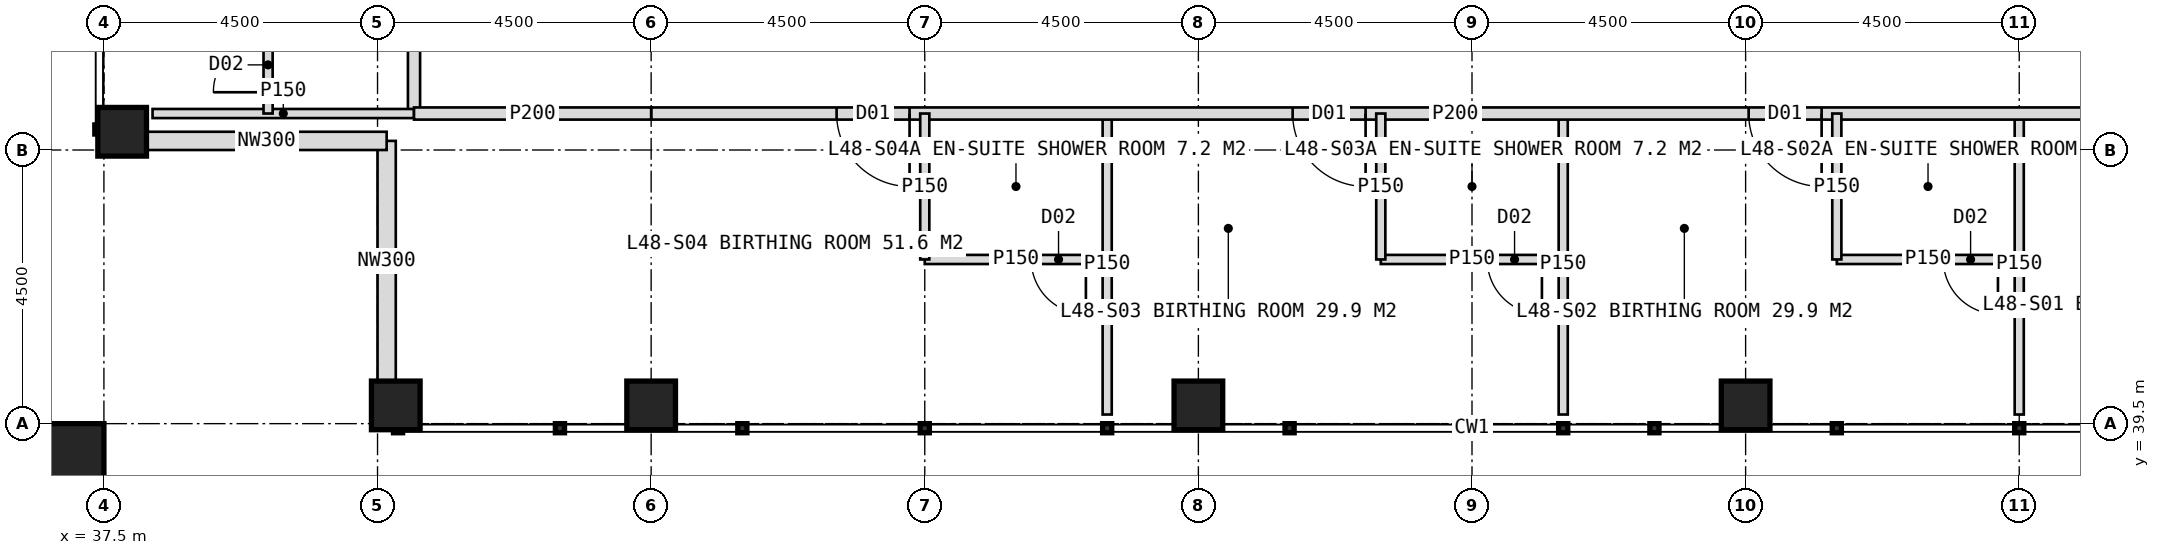
"""IFC4 building model, lengths in metres.
Left out: names, types, materials, properties, quantities, classifications, styles, units other than length and angle.
Written with IfcOpenShell. Run it as: python <this file> out.ifc"""

import sys

from ifc_helpers import new_model, si_unit, direction, frame, frame_2d, origin, origin_2d, place, context, subcontext, project, spatial, rectangle, hollow_rectangle, extrude, element, fill, save


model = new_model("IFC4")
c1 = context("Model", 3, precision=1e-05, world=origin(), true_north=direction((0.0, 1.0)))
c2 = subcontext(c1, "Body", "Model", "MODEL_VIEW")
j1 = project(units=[si_unit("LENGTHUNIT", "METRE"), si_unit("PLANEANGLEUNIT", "RADIAN")], contexts=[c1])
p1 = place(None, origin())
s1 = spatial("IfcSite", under=j1, at=p1, CompositionType="ELEMENT")
p2 = place(p1, origin())
s2 = spatial("IfcBuilding", under=s1, at=p2, CompositionType="ELEMENT")
p3 = place(p2, frame((0.0, 0.0, 201.0)))
s3 = spatial("IfcBuildingStorey", under=s2, at=p3, CompositionType="ELEMENT", Elevation=201.0)
for number, where, z_axis, x_axis in (
    (1, (42.3, 39.8, 0.0), (0.0, 0.0, 1.0), (1.0, 0.0, 0.0)),
    (2, (37.8, 44.3, 0.0), (0.0, 0.0, 1.0), (1.0, 0.0, 0.0)),
    (3, (46.5, 39.8, 0.0), (0.0, 0.0, 1.0), (1.0, 0.0, 0.0)),
    (4, (55.5, 39.8, 0.0), (0.0, 0.0, 1.0), (1.0, 0.0, 0.0)),
    (5, (64.5, 39.8, 0.0), (0.0, 0.0, 1.0), (1.0, 0.0, 0.0)),
):
    element("IfcColumn", number, at=place(p3, frame(where, z_axis=z_axis, x_axis=x_axis)), inside=s3, PredefinedType="COLUMN", context=c2, shape_type="SweptSolid", body=[
        extrude(hollow_rectangle(XDim=0.8, YDim=0.8, WallThickness=0.08, at=origin_2d()), origin(), (0.0, 0.0, 1.0), 4.0),
    ])
p4 = place(p3, frame((36.9, 38.9, 0.0), z_axis=(0.0, 0.0, 1.0), x_axis=(1.0, 0.0, 0.0)))
e6 = element("IfcColumn", 6, at=p4, inside=s3, PredefinedType="COLUMN", context=c2, shape_type="SweptSolid", body=[
    extrude(hollow_rectangle(XDim=1.2, YDim=1.2, WallThickness=0.07, at=origin_2d()), origin(), (0.0, 0.0, 1.0), 4.0),
])
for number, where, z_axis, x_axis in (
    (7, (42.15, 40.2, 0.0), (0.0, 0.0, 1.0), (0.0, 1.0, 0.0)),
    (8, (42.15, 44.15, 0.0), (0.0, 0.0, 1.0), (-1.0, 0.0, 0.0)),
):
    element("IfcWall", number, at=place(p3, frame(where, z_axis=z_axis, x_axis=x_axis)), inside=s3, PredefinedType="ELEMENTEDWALL", context=c2, shape_type="SweptSolid", body=[
        extrude(rectangle(XDim=3.95, YDim=0.3, at=frame_2d((1.975, 0.0))), origin(), (0.0, 0.0, 1.0), 2.85),
    ])
p5 = place(p3, frame((42.6, 44.6, 0.0), z_axis=(0.0, 0.0, 1.0), x_axis=(0.0, 1.0, 0.0)))
e9 = element("IfcWall", 9, at=p5, inside=s3, PredefinedType="PARTITIONING", context=c2, shape_type="SweptSolid", body=[
    extrude(rectangle(XDim=4.45, YDim=0.2, at=frame_2d((2.225, 0.0))), origin(), (0.0, 0.0, 1.0), 2.85),
])
p6 = place(p5, frame((3.25, 0.0, 0.0)))
e10 = element("IfcOpeningElement", 10, at=p6, cuts=e9, PredefinedType="OPENING", context=c2, shape_type="SweptSolid", body=[
    extrude(rectangle(XDim=1.2, YDim=2.2, at=frame_2d((0.6, 1.1))), frame((0.0, 0.11, 0.0), z_axis=(0.0, -1.0, 0.0), x_axis=(1.0, 0.0, 0.0)), (0.0, 0.0, 1.0), 0.22),
])
p7 = place(p3, frame((42.6, 44.6, 0.0), z_axis=(0.0, 0.0, 1.0), x_axis=(-1.0, 0.0, 0.0)))
e11 = element("IfcWall", 11, at=p7, inside=s3, PredefinedType="PARTITIONING", context=c2, shape_type="SweptSolid", body=[
    extrude(rectangle(XDim=4.3, YDim=0.15, at=frame_2d((2.15, 0.0))), origin(), (0.0, 0.0, 1.0), 2.85),
])
p8 = place(p3, frame((40.2, 44.6, 0.0), z_axis=(0.0, 0.0, 1.0), x_axis=(0.0, 1.0, 0.0)))
e12 = element("IfcWall", 12, at=p8, inside=s3, PredefinedType="PARTITIONING", context=c2, shape_type="SweptSolid", body=[
    extrude(rectangle(XDim=3.0, YDim=0.15, at=frame_2d((1.5, 0.0))), origin(), (0.0, 0.0, 1.0), 3.75),
])
p9 = place(p8, frame((0.35, 0.0, 0.0)))
e13 = element("IfcOpeningElement", 13, at=p9, cuts=e12, PredefinedType="OPENING", context=c2, shape_type="SweptSolid", body=[
    extrude(rectangle(XDim=0.9, YDim=2.1, at=frame_2d((0.45, 1.05))), frame((0.0, 0.085, 0.0), z_axis=(0.0, -1.0, 0.0), x_axis=(1.0, 0.0, 0.0)), (0.0, 0.0, 1.0), 0.17),
])
for number, where, z_axis, x_axis in (
    (14, (69.0, 44.6, 0.0), (0.0, 0.0, 1.0), (0.0, -1.0, 0.0)),
    (15, (61.5, 44.6, 0.0), (0.0, 0.0, 1.0), (0.0, -1.0, 0.0)),
    (16, (54.0, 44.6, 0.0), (0.0, 0.0, 1.0), (0.0, -1.0, 0.0)),
):
    element("IfcWall", number, at=place(p3, frame(where, z_axis=z_axis, x_axis=x_axis)), inside=s3, PredefinedType="PARTITIONING", context=c2, shape_type="SweptSolid", body=[
        extrude(rectangle(XDim=4.95, YDim=0.15, at=frame_2d((2.475, 0.0))), origin(), (0.0, 0.0, 1.0), 3.75),
    ])
p10 = place(p3, frame((72.95, 44.6, 0.0), z_axis=(0.0, 0.0, 1.0), x_axis=(-1.0, 0.0, 0.0)))
e17 = element("IfcWall", 17, at=p10, inside=s3, PredefinedType="PARTITIONING", context=c2, shape_type="SweptSolid", body=[
    extrude(rectangle(XDim=26.45, YDim=0.2, at=frame_2d((13.225, 0.0))), origin(), (0.0, 0.0, 1.0), 3.75),
])
p11 = place(p10, frame((7.2, 0.0, 0.0)))
e18 = element("IfcOpeningElement", 18, at=p11, cuts=e17, PredefinedType="OPENING", context=c2, shape_type="SweptSolid", body=[
    extrude(rectangle(XDim=1.2, YDim=2.2, at=frame_2d((0.6, 1.1))), frame((0.0, 0.11, 0.0), z_axis=(0.0, -1.0, 0.0), x_axis=(1.0, 0.0, 0.0)), (0.0, 0.0, 1.0), 0.22),
])
p12 = place(p10, frame((14.7, 0.0, 0.0)))
e19 = element("IfcOpeningElement", 19, at=p12, cuts=e17, PredefinedType="OPENING", context=c2, shape_type="SweptSolid", body=[
    extrude(rectangle(XDim=1.2, YDim=2.2, at=frame_2d((0.6, 1.1))), frame((0.0, 0.11, 0.0), z_axis=(0.0, -1.0, 0.0), x_axis=(1.0, 0.0, 0.0)), (0.0, 0.0, 1.0), 0.22),
])
p13 = place(p10, frame((22.2, 0.0, 0.0)))
e20 = element("IfcOpeningElement", 20, at=p13, cuts=e17, PredefinedType="OPENING", context=c2, shape_type="SweptSolid", body=[
    extrude(rectangle(XDim=1.2, YDim=2.2, at=frame_2d((0.6, 1.1))), frame((0.0, 0.11, 0.0), z_axis=(0.0, -1.0, 0.0), x_axis=(1.0, 0.0, 0.0)), (0.0, 0.0, 1.0), 0.22),
])
p14 = place(p3, frame((46.5, 44.6, 0.0), z_axis=(0.0, 0.0, 1.0), x_axis=(-1.0, 0.0, 0.0)))
e21 = element("IfcWall", 21, at=p14, inside=s3, PredefinedType="PARTITIONING", context=c2, shape_type="SweptSolid", body=[
    extrude(rectangle(XDim=3.9, YDim=0.2, at=frame_2d((1.95, 0.0))), origin(), (0.0, 0.0, 1.0), 2.85),
])
p15 = place(p3, frame((69.0, 42.2, 0.0), z_axis=(0.0, 0.0, 1.0), x_axis=(-1.0, 0.0, 0.0)))
e22 = element("IfcWall", 22, at=p15, inside=s3, PredefinedType="PARTITIONING", context=c2, shape_type="SweptSolid", body=[
    extrude(rectangle(XDim=3.0, YDim=0.15, at=frame_2d((1.5, 0.0))), origin(), (0.0, 0.0, 1.0), 3.75),
])
p16 = place(p15, frame((0.35, 0.0, 0.0)))
e23 = element("IfcOpeningElement", 23, at=p16, cuts=e22, PredefinedType="OPENING", context=c2, shape_type="SweptSolid", body=[
    extrude(rectangle(XDim=0.9, YDim=2.1, at=frame_2d((0.45, 1.05))), frame((0.0, 0.085, 0.0), z_axis=(0.0, -1.0, 0.0), x_axis=(1.0, 0.0, 0.0)), (0.0, 0.0, 1.0), 0.17),
])
p17 = place(p3, frame((66.0, 44.6, 0.0), z_axis=(0.0, 0.0, 1.0), x_axis=(0.0, -1.0, 0.0)))
e24 = element("IfcWall", 24, at=p17, inside=s3, PredefinedType="PARTITIONING", context=c2, shape_type="SweptSolid", body=[
    extrude(rectangle(XDim=2.4, YDim=0.15, at=frame_2d((1.2, 0.0))), origin(), (0.0, 0.0, 1.0), 3.75),
])
p18 = place(p3, frame((61.5, 42.2, 0.0), z_axis=(0.0, 0.0, 1.0), x_axis=(-1.0, 0.0, 0.0)))
e25 = element("IfcWall", 25, at=p18, inside=s3, PredefinedType="PARTITIONING", context=c2, shape_type="SweptSolid", body=[
    extrude(rectangle(XDim=3.0, YDim=0.15, at=frame_2d((1.5, 0.0))), origin(), (0.0, 0.0, 1.0), 3.75),
])
p19 = place(p18, frame((0.35, 0.0, 0.0)))
e26 = element("IfcOpeningElement", 26, at=p19, cuts=e25, PredefinedType="OPENING", context=c2, shape_type="SweptSolid", body=[
    extrude(rectangle(XDim=0.9, YDim=2.1, at=frame_2d((0.45, 1.05))), frame((0.0, 0.085, 0.0), z_axis=(0.0, -1.0, 0.0), x_axis=(1.0, 0.0, 0.0)), (0.0, 0.0, 1.0), 0.17),
])
p20 = place(p3, frame((58.5, 44.6, 0.0), z_axis=(0.0, 0.0, 1.0), x_axis=(0.0, -1.0, 0.0)))
e27 = element("IfcWall", 27, at=p20, inside=s3, PredefinedType="PARTITIONING", context=c2, shape_type="SweptSolid", body=[
    extrude(rectangle(XDim=2.4, YDim=0.15, at=frame_2d((1.2, 0.0))), origin(), (0.0, 0.0, 1.0), 3.75),
])
p21 = place(p3, frame((54.0, 42.2, 0.0), z_axis=(0.0, 0.0, 1.0), x_axis=(-1.0, 0.0, 0.0)))
e28 = element("IfcWall", 28, at=p21, inside=s3, PredefinedType="PARTITIONING", context=c2, shape_type="SweptSolid", body=[
    extrude(rectangle(XDim=3.0, YDim=0.15, at=frame_2d((1.5, 0.0))), origin(), (0.0, 0.0, 1.0), 3.75),
])
p22 = place(p21, frame((0.35, 0.0, 0.0)))
e29 = element("IfcOpeningElement", 29, at=p22, cuts=e28, PredefinedType="OPENING", context=c2, shape_type="SweptSolid", body=[
    extrude(rectangle(XDim=0.9, YDim=2.1, at=frame_2d((0.45, 1.05))), frame((0.0, 0.085, 0.0), z_axis=(0.0, -1.0, 0.0), x_axis=(1.0, 0.0, 0.0)), (0.0, 0.0, 1.0), 0.17),
])
p23 = place(p3, frame((51.0, 44.6, 0.0), z_axis=(0.0, 0.0, 1.0), x_axis=(0.0, -1.0, 0.0)))
e30 = element("IfcWall", 30, at=p23, inside=s3, PredefinedType="PARTITIONING", context=c2, shape_type="SweptSolid", body=[
    extrude(rectangle(XDim=2.4, YDim=0.15, at=frame_2d((1.2, 0.0))), origin(), (0.0, 0.0, 1.0), 3.75),
])
p24 = place(p9, origin())
e31 = element("IfcDoor", 31, at=p24, inside=s3, OperationType="SINGLE_SWING_LEFT", PredefinedType="DOOR", context=c2, shape_type="SweptSolid", body=[
    extrude(rectangle(XDim=0.9, YDim=2.1, at=frame_2d((0.45, 1.05))), frame((0.0, 0.025, 0.0), z_axis=(0.0, -1.0, 0.0), x_axis=(1.0, 0.0, 0.0)), (0.0, 0.0, 1.0), 0.05),
])
fill(e13, e31)
p25 = place(p11, origin())
e32 = element("IfcDoor", 32, at=p25, inside=s3, OperationType="SINGLE_SWING_LEFT", PredefinedType="DOOR", context=c2, shape_type="SweptSolid", body=[
    extrude(rectangle(XDim=1.2, YDim=2.2, at=frame_2d((0.6, 1.1))), frame((0.0, 0.025, 0.0), z_axis=(0.0, -1.0, 0.0), x_axis=(1.0, 0.0, 0.0)), (0.0, 0.0, 1.0), 0.05),
])
fill(e18, e32)
p26 = place(p16, origin())
e33 = element("IfcDoor", 33, at=p26, inside=s3, OperationType="SINGLE_SWING_LEFT", PredefinedType="DOOR", context=c2, shape_type="SweptSolid", body=[
    extrude(rectangle(XDim=0.9, YDim=2.1, at=frame_2d((0.45, 1.05))), frame((0.0, 0.025, 0.0), z_axis=(0.0, -1.0, 0.0), x_axis=(1.0, 0.0, 0.0)), (0.0, 0.0, 1.0), 0.05),
])
fill(e23, e33)
p27 = place(p12, origin())
e34 = element("IfcDoor", 34, at=p27, inside=s3, OperationType="SINGLE_SWING_LEFT", PredefinedType="DOOR", context=c2, shape_type="SweptSolid", body=[
    extrude(rectangle(XDim=1.2, YDim=2.2, at=frame_2d((0.6, 1.1))), frame((0.0, 0.025, 0.0), z_axis=(0.0, -1.0, 0.0), x_axis=(1.0, 0.0, 0.0)), (0.0, 0.0, 1.0), 0.05),
])
fill(e19, e34)
p28 = place(p19, origin())
e35 = element("IfcDoor", 35, at=p28, inside=s3, OperationType="SINGLE_SWING_LEFT", PredefinedType="DOOR", context=c2, shape_type="SweptSolid", body=[
    extrude(rectangle(XDim=0.9, YDim=2.1, at=frame_2d((0.45, 1.05))), frame((0.0, 0.025, 0.0), z_axis=(0.0, -1.0, 0.0), x_axis=(1.0, 0.0, 0.0)), (0.0, 0.0, 1.0), 0.05),
])
fill(e26, e35)
p29 = place(p13, origin())
e36 = element("IfcDoor", 36, at=p29, inside=s3, OperationType="SINGLE_SWING_LEFT", PredefinedType="DOOR", context=c2, shape_type="SweptSolid", body=[
    extrude(rectangle(XDim=1.2, YDim=2.2, at=frame_2d((0.6, 1.1))), frame((0.0, 0.025, 0.0), z_axis=(0.0, -1.0, 0.0), x_axis=(1.0, 0.0, 0.0)), (0.0, 0.0, 1.0), 0.05),
])
fill(e20, e36)
p30 = place(p22, origin())
e37 = element("IfcDoor", 37, at=p30, inside=s3, OperationType="SINGLE_SWING_LEFT", PredefinedType="DOOR", context=c2, shape_type="SweptSolid", body=[
    extrude(rectangle(XDim=0.9, YDim=2.1, at=frame_2d((0.45, 1.05))), frame((0.0, 0.025, 0.0), z_axis=(0.0, -1.0, 0.0), x_axis=(1.0, 0.0, 0.0)), (0.0, 0.0, 1.0), 0.05),
])
fill(e29, e37)
save(model, sys.argv[1])
